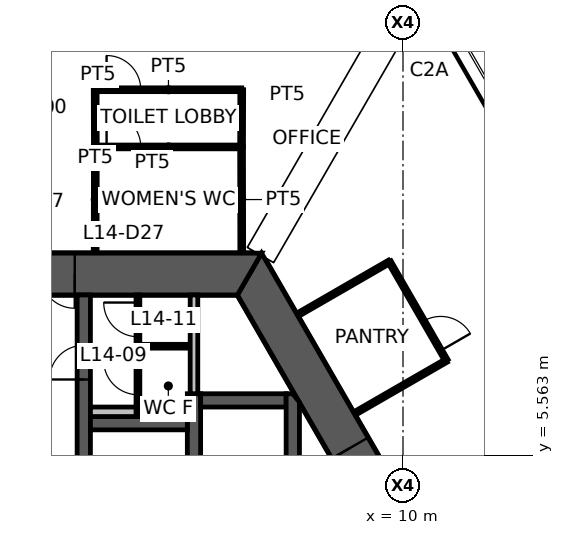
"""IFC4 building model, lengths in metres.
Left out: names, types, materials, properties, quantities, classifications, styles, units other than length and angle.
Written with IfcOpenShell. Run it as: python <this file> out.ifc"""

import sys

from ifc_helpers import new_model, si_unit, direction, frame, frame_2d, origin, place, context, subcontext, project, spatial, polyline, rectangle, outline, extrude, element, fill, save


model = new_model("IFC4")
c1 = context("Model", 3, precision=1e-05, world=origin(), true_north=direction((0.0, 1.0)))
c2 = subcontext(c1, "Body", "Model", "MODEL_VIEW")
j1 = project(units=[si_unit("LENGTHUNIT", "METRE"), si_unit("PLANEANGLEUNIT", "RADIAN")], contexts=[c1])
p1 = place(None, origin())
s1 = spatial("IfcSite", under=j1, at=p1, CompositionType="ELEMENT")
p2 = place(p1, origin())
s2 = spatial("IfcBuilding", under=s1, at=p2, CompositionType="ELEMENT")
p3 = place(p2, frame((0.0, 0.0, 57.0)))
s3 = spatial("IfcBuildingStorey", under=s2, at=p3, CompositionType="ELEMENT", Elevation=57.0)
p4 = place(p3, frame((11.922, 0.0, 0.0), z_axis=(0.0, 0.0, 1.0), x_axis=(-0.500004296715, 0.866022923061, 0.0)))
e1 = element("IfcWall", 1, at=p4, inside=s3, PredefinedType="SHEAR", context=c2, shape_type="SweptSolid", body=[
    extrude(outline(polyline([(-0.318, -0.55), (5.835, -0.55), (6.635, -0.55), (12.24, -0.55), (11.605, 0.55), (6.635, 0.55), (5.835, 0.55), (0.318, 0.55), (-0.318, -0.55)])), origin(), (0.0, 0.0, 1.0), 4.2),
])
p5 = place(p4, frame((5.835, 0.0, 0.0)))
e2 = element("IfcOpeningElement", 2, at=p5, cuts=e1, PredefinedType="OPENING", context=c2, shape_type="SweptSolid", body=[
    extrude(rectangle(XDim=0.8, YDim=2.1, at=frame_2d((0.4, 1.05))), frame((0.0, 0.56, 0.0), z_axis=(0.0, -1.0, 0.0), x_axis=(1.0, 0.0, 0.0)), (0.0, 0.0, 1.0), 1.12),
])
p6 = place(p3, frame((5.961, 10.325, 0.0), z_axis=(0.0, 0.0, 1.0), x_axis=(-1.0, 0.0, 0.0)))
e3 = element("IfcWall", 3, at=p6, inside=s3, PredefinedType="SHEAR", context=c2, shape_type="SweptSolid", body=[
    extrude(outline(polyline([(-0.318, -0.55), (4.599, -0.55), (5.499, -0.55), (6.424, -0.55), (7.323, -0.55), (12.24, -0.55), (11.605, 0.55), (7.323, 0.55), (6.424, 0.55), (5.499, 0.55), (4.599, 0.55), (0.318, 0.55), (-0.318, -0.55)])), origin(), (0.0, 0.0, 1.0), 4.2),
])
p7 = place(p6, frame((6.424, 0.0, 0.0)))
e4 = element("IfcOpeningElement", 4, at=p7, cuts=e3, PredefinedType="OPENING", context=c2, shape_type="SweptSolid", body=[
    extrude(rectangle(XDim=0.9, YDim=2.1, at=frame_2d((0.45, 1.05))), frame((0.0, 0.56, 0.0), z_axis=(0.0, -1.0, 0.0), x_axis=(1.0, 0.0, 0.0)), (0.0, 0.0, 1.0), 1.12),
])
p8 = place(p6, frame((4.599, 0.0, 0.0)))
e5 = element("IfcOpeningElement", 5, at=p8, cuts=e3, PredefinedType="OPENING", context=c2, shape_type="SweptSolid", body=[
    extrude(rectangle(XDim=0.9, YDim=2.1, at=frame_2d((0.45, 1.05))), frame((0.0, 0.56, 0.0), z_axis=(0.0, -1.0, 0.0), x_axis=(1.0, 0.0, 0.0)), (0.0, 0.0, 1.0), 1.12),
])
p9 = place(p3, frame((1.6, 3.775, 0.0), z_axis=(0.0, 0.0, 1.0), x_axis=(0.0, 1.0, 0.0)))
e6 = element("IfcWall", 6, at=p9, inside=s3, PredefinedType="SHEAR", context=c2, shape_type="SweptSolid", body=[
    extrude(rectangle(XDim=6.0, YDim=0.35, at=frame_2d((3.0, 0.0))), origin(), (0.0, 0.0, 1.0), 4.2),
])
p10 = place(p9, frame((3.775, 0.0, 0.0)))
e7 = element("IfcOpeningElement", 7, at=p10, cuts=e6, PredefinedType="OPENING", context=c2, shape_type="SweptSolid", body=[
    extrude(rectangle(XDim=0.9, YDim=2.1, at=frame_2d((0.45, 1.05))), frame((0.0, 0.185, 0.0), z_axis=(0.0, -1.0, 0.0), x_axis=(1.0, 0.0, 0.0)), (0.0, 0.0, 1.0), 0.37),
])
p11 = place(p3, frame((4.5, 3.775, 0.0), z_axis=(0.0, 0.0, 1.0), x_axis=(0.0, 1.0, 0.0)))
e8 = element("IfcWall", 8, at=p11, inside=s3, PredefinedType="SHEAR", context=c2, shape_type="SweptSolid", body=[
    extrude(rectangle(XDim=3.4, YDim=0.35, at=frame_2d((1.7, 0.0))), origin(), (0.0, 0.0, 1.0), 4.2),
])
p12 = place(p3, frame((1.775, 6.4, 0.0), z_axis=(0.0, 0.0, 1.0), x_axis=(1.0, 0.0, 0.0)))
e9 = element("IfcWall", 9, at=p12, inside=s3, PredefinedType="SHEAR", context=c2, shape_type="SweptSolid", body=[
    extrude(rectangle(XDim=2.55, YDim=0.35, at=frame_2d((1.275, 0.0))), origin(), (0.0, 0.0, 1.0), 4.2),
])
p13 = place(p3, frame((4.675, 7.0, 0.0), z_axis=(0.0, 0.0, 1.0), x_axis=(1.0, 0.0, 0.0)))
e10 = element("IfcWall", 10, at=p13, inside=s3, PredefinedType="SHEAR", context=c2, shape_type="SweptSolid", body=[
    extrude(rectangle(XDim=2.25, YDim=0.35, at=frame_2d((1.125, 0.0))), origin(), (0.0, 0.0, 1.0), 4.2),
])
p14 = place(p3, frame((7.1, 3.775, 0.0), z_axis=(0.0, 0.0, 1.0), x_axis=(0.0, 1.0, 0.0)))
e11 = element("IfcWall", 11, at=p14, inside=s3, PredefinedType="SHEAR", context=c2, shape_type="SweptSolid", body=[
    extrude(outline(polyline([(0.0, -0.175), (3.175, -0.175), (3.4, 0.0), (3.4, 0.175), (0.0, 0.175), (0.0, -0.175)])), origin(), (0.0, 0.0, 1.0), 4.2),
])
p15 = place(p3, frame((4.5, 7.175, 0.0), z_axis=(0.0, 0.0, 1.0), x_axis=(0.0, 1.0, 0.0)))
e12 = element("IfcWall", 12, at=p15, inside=s3, PredefinedType="STANDARD", context=c2, shape_type="SweptSolid", body=[
    extrude(rectangle(XDim=2.6, YDim=0.2, at=frame_2d((1.3, 0.0))), origin(), (0.0, 0.0, 1.0), 4.2),
])
p16 = place(p3, frame((1.775, 6.7, 0.0), z_axis=(0.0, 0.0, 1.0), x_axis=(1.0, 0.0, 0.0)))
e13 = element("IfcWall", 13, at=p16, inside=s3, PredefinedType="PLUMBINGWALL", context=c2, shape_type="SweptSolid", body=[
    extrude(rectangle(XDim=2.55, YDim=0.25, at=frame_2d((1.275, 0.0))), origin(), (0.0, 0.0, 1.0), 4.2),
])
p17 = place(p3, frame((3.025, 6.575, 0.0), z_axis=(0.0, 0.0, 1.0), x_axis=(0.0, 1.0, 0.0)))
e14 = element("IfcWall", 14, at=p17, inside=s3, PredefinedType="PARTITIONING", context=c2, shape_type="SweptSolid", body=[
    extrude(rectangle(XDim=3.2, YDim=0.1, at=frame_2d((1.6, 0.0))), origin(), (0.0, 0.0, 1.0), 3.25),
])
p18 = place(p17, frame((0.575, 0.0, 0.0)))
e15 = element("IfcOpeningElement", 15, at=p18, cuts=e14, PredefinedType="OPENING", context=c2, shape_type="SweptSolid", body=[
    extrude(rectangle(XDim=0.9, YDim=2.1, at=frame_2d((0.45, 1.05))), frame((0.0, 0.06, 0.0), z_axis=(0.0, -1.0, 0.0), x_axis=(1.0, 0.0, 0.0)), (0.0, 0.0, 1.0), 0.12),
])
p19 = place(p17, frame((2.1, 0.0, 0.0)))
e16 = element("IfcOpeningElement", 16, at=p19, cuts=e14, PredefinedType="OPENING", context=c2, shape_type="SweptSolid", body=[
    extrude(rectangle(XDim=0.9, YDim=2.1, at=frame_2d((0.45, 1.05))), frame((0.0, 0.06, 0.0), z_axis=(0.0, -1.0, 0.0), x_axis=(1.0, 0.0, 0.0)), (0.0, 0.0, 1.0), 0.12),
])
p20 = place(p3, frame((3.075, 8.425, 0.0), z_axis=(0.0, 0.0, 1.0), x_axis=(1.0, 0.0, 0.0)))
e17 = element("IfcWall", 17, at=p20, inside=s3, PredefinedType="PARTITIONING", context=c2, shape_type="SweptSolid", body=[
    extrude(rectangle(XDim=1.25, YDim=0.1, at=frame_2d((0.625, 0.0))), origin(), (0.0, 0.0, 1.0), 3.25),
])
p21 = place(p3, frame((1.9, 13.67, 0.0), z_axis=(0.0, 0.0, 1.0), x_axis=(1.0, 0.0, 0.0)))
e18 = element("IfcWall", 18, at=p21, inside=s3, PredefinedType="PARTITIONING", context=c2, shape_type="SweptSolid", body=[
    extrude(rectangle(XDim=3.857, YDim=0.1, at=frame_2d((1.929, 0.0))), origin(), (0.0, 0.0, 1.0), 3.25),
])
p22 = place(p21, frame((0.3, 0.0, 0.0)))
e19 = element("IfcOpeningElement", 19, at=p22, cuts=e18, PredefinedType="OPENING", context=c2, shape_type="SweptSolid", body=[
    extrude(rectangle(XDim=0.9, YDim=2.1, at=frame_2d((0.45, 1.05))), frame((0.0, 0.06, 0.0), z_axis=(0.0, -1.0, 0.0), x_axis=(1.0, 0.0, 0.0)), (0.0, 0.0, 1.0), 0.12),
])
for number, where, z_axis, x_axis in (
    (20, (1.9, 10.895, 0.0), (0.0, 0.0, 1.0), (0.002, 1.0, 0.0)),
    (21, (5.752, 13.675, 0.0), (0.0, 0.0, 1.0), (0.002, -1.0, 0.0)),
):
    element("IfcWall", number, at=place(p3, frame(where, z_axis=z_axis, x_axis=x_axis)), inside=s3, PredefinedType="PARTITIONING", context=c2, shape_type="SweptSolid", body=[
        extrude(rectangle(XDim=2.78, YDim=0.1, at=frame_2d((1.39, 0.0))), origin(), (0.0, 0.0, 1.0), 3.25),
    ])
p23 = place(p3, frame((1.9, 15.175, 0.0), z_axis=(0.0, 0.0, 1.0), x_axis=(1.0, 0.0, 0.0)))
e22 = element("IfcWall", 22, at=p23, inside=s3, PredefinedType="PARTITIONING", context=c2, shape_type="SweptSolid", body=[
    extrude(rectangle(XDim=3.857, YDim=0.1, at=frame_2d((1.929, 0.0))), origin(), (0.0, 0.0, 1.0), 3.25),
])
p24 = place(p23, frame((0.3, 0.0, 0.0)))
e23 = element("IfcOpeningElement", 23, at=p24, cuts=e22, PredefinedType="OPENING", context=c2, shape_type="SweptSolid", body=[
    extrude(rectangle(XDim=0.9, YDim=2.1, at=frame_2d((0.45, 1.05))), frame((0.0, 0.06, 0.0), z_axis=(0.0, -1.0, 0.0), x_axis=(1.0, 0.0, 0.0)), (0.0, 0.0, 1.0), 0.12),
])
for number, where, z_axis, x_axis in (
    (24, (1.905, 13.675, 0.0), (0.0, 0.0, 1.0), (-0.003, 1.0, 0.0)),
    (25, (5.757, 15.175, 0.0), (0.0, 0.0, 1.0), (-0.003, -1.0, 0.0)),
):
    element("IfcWall", number, at=place(p3, frame(where, z_axis=z_axis, x_axis=x_axis)), inside=s3, PredefinedType="PARTITIONING", context=c2, shape_type="SweptSolid", body=[
        extrude(rectangle(XDim=1.5, YDim=0.1, at=frame_2d((0.75, 0.0))), origin(), (0.0, 0.0, 1.0), 3.25),
    ])
p25 = place(p3, frame((7.235, 9.258, 0.0), z_axis=(0.0, 0.0, 1.0), x_axis=(0.86603494908, 0.499983466698, 0.0)))
e26 = element("IfcWall", 26, at=p25, inside=s3, PredefinedType="PARTITIONING", context=c2, shape_type="SweptSolid", body=[
    extrude(rectangle(XDim=2.78, YDim=0.1, at=frame_2d((1.39, 0.0))), origin(), (0.0, 0.0, 1.0), 3.25),
])
p26 = place(p3, frame((9.643, 10.648, 0.0), z_axis=(0.0, 0.0, 1.0), x_axis=(0.499990139034, -0.866031096941, 0.0)))
e27 = element("IfcWall", 27, at=p26, inside=s3, PredefinedType="PARTITIONING", context=c2, shape_type="SweptSolid", body=[
    extrude(rectangle(XDim=3.0, YDim=0.1, at=frame_2d((1.5, 0.0))), origin(), (0.0, 0.0, 1.0), 3.25),
])
p27 = place(p26, frame((1.8, 0.0, 0.0)))
e28 = element("IfcOpeningElement", 28, at=p27, cuts=e27, PredefinedType="OPENING", context=c2, shape_type="SweptSolid", body=[
    extrude(rectangle(XDim=0.9, YDim=2.1, at=frame_2d((0.45, 1.05))), frame((0.0, 0.06, 0.0), z_axis=(0.0, -1.0, 0.0), x_axis=(1.0, 0.0, 0.0)), (0.0, 0.0, 1.0), 0.12),
])
p28 = place(p3, frame((11.143, 8.05, 0.0), z_axis=(0.0, 0.0, 1.0), x_axis=(-0.86603494908, -0.499983466698, 0.0)))
e29 = element("IfcWall", 29, at=p28, inside=s3, PredefinedType="PARTITIONING", context=c2, shape_type="SweptSolid", body=[
    extrude(rectangle(XDim=2.78, YDim=0.1, at=frame_2d((1.39, 0.0))), origin(), (0.0, 0.0, 1.0), 3.25),
])
p29 = place(p8, origin())
e30 = element("IfcDoor", 30, at=p29, inside=s3, OperationType="SINGLE_SWING_LEFT", PredefinedType="DOOR", context=c2, shape_type="SweptSolid", body=[
    extrude(rectangle(XDim=0.9, YDim=2.1, at=frame_2d((0.45, 1.05))), frame((0.0, 0.025, 0.0), z_axis=(0.0, -1.0, 0.0), x_axis=(1.0, 0.0, 0.0)), (0.0, 0.0, 1.0), 0.05),
])
fill(e5, e30)
p30 = place(p5, origin())
e31 = element("IfcDoor", 31, at=p30, inside=s3, OperationType="SINGLE_SWING_RIGHT", PredefinedType="DOOR", context=c2, shape_type="SweptSolid", body=[
    extrude(rectangle(XDim=0.8, YDim=2.1, at=frame_2d((0.4, 1.05))), frame((0.0, 0.025, 0.0), z_axis=(0.0, -1.0, 0.0), x_axis=(1.0, 0.0, 0.0)), (0.0, 0.0, 1.0), 0.05),
])
fill(e2, e31)
p31 = place(p10, origin())
e32 = element("IfcDoor", 32, at=p31, inside=s3, OperationType="SINGLE_SWING_LEFT", PredefinedType="DOOR", context=c2, shape_type="SweptSolid", body=[
    extrude(rectangle(XDim=0.9, YDim=2.1, at=frame_2d((0.45, 1.05))), frame((0.0, 0.025, 0.0), z_axis=(0.0, -1.0, 0.0), x_axis=(1.0, 0.0, 0.0)), (0.0, 0.0, 1.0), 0.05),
])
fill(e7, e32)
p32 = place(p18, origin())
e33 = element("IfcDoor", 33, at=p32, inside=s3, OperationType="SINGLE_SWING_RIGHT", PredefinedType="DOOR", context=c2, shape_type="SweptSolid", body=[
    extrude(rectangle(XDim=0.9, YDim=2.1, at=frame_2d((0.45, 1.05))), frame((0.0, 0.025, 0.0), z_axis=(0.0, -1.0, 0.0), x_axis=(1.0, 0.0, 0.0)), (0.0, 0.0, 1.0), 0.05),
])
fill(e15, e33)
p33 = place(p19, origin())
e34 = element("IfcDoor", 34, at=p33, inside=s3, OperationType="SINGLE_SWING_RIGHT", PredefinedType="DOOR", context=c2, shape_type="SweptSolid", body=[
    extrude(rectangle(XDim=0.9, YDim=2.1, at=frame_2d((0.45, 1.05))), frame((0.0, 0.025, 0.0), z_axis=(0.0, -1.0, 0.0), x_axis=(1.0, 0.0, 0.0)), (0.0, 0.0, 1.0), 0.05),
])
fill(e16, e34)
p34 = place(p22, origin())
e35 = element("IfcDoor", 35, at=p34, inside=s3, OperationType="SINGLE_SWING_LEFT", PredefinedType="DOOR", context=c2, shape_type="SweptSolid", body=[
    extrude(rectangle(XDim=0.9, YDim=2.1, at=frame_2d((0.45, 1.05))), frame((0.0, 0.025, 0.0), z_axis=(0.0, -1.0, 0.0), x_axis=(1.0, 0.0, 0.0)), (0.0, 0.0, 1.0), 0.05),
])
fill(e19, e35)
p35 = place(p24, origin())
e36 = element("IfcDoor", 36, at=p35, inside=s3, OperationType="SINGLE_SWING_LEFT", PredefinedType="DOOR", context=c2, shape_type="SweptSolid", body=[
    extrude(rectangle(XDim=0.9, YDim=2.1, at=frame_2d((0.45, 1.05))), frame((0.0, 0.025, 0.0), z_axis=(0.0, -1.0, 0.0), x_axis=(1.0, 0.0, 0.0)), (0.0, 0.0, 1.0), 0.05),
])
fill(e23, e36)
p36 = place(p27, origin())
e37 = element("IfcDoor", 37, at=p36, inside=s3, OperationType="SINGLE_SWING_RIGHT", PredefinedType="DOOR", context=c2, shape_type="SweptSolid", body=[
    extrude(rectangle(XDim=0.9, YDim=2.1, at=frame_2d((0.45, 1.05))), frame((0.0, 0.025, 0.0), z_axis=(0.0, -1.0, 0.0), x_axis=(1.0, 0.0, 0.0)), (0.0, 0.0, 1.0), 0.05),
])
fill(e28, e37)
save(model, sys.argv[1])
